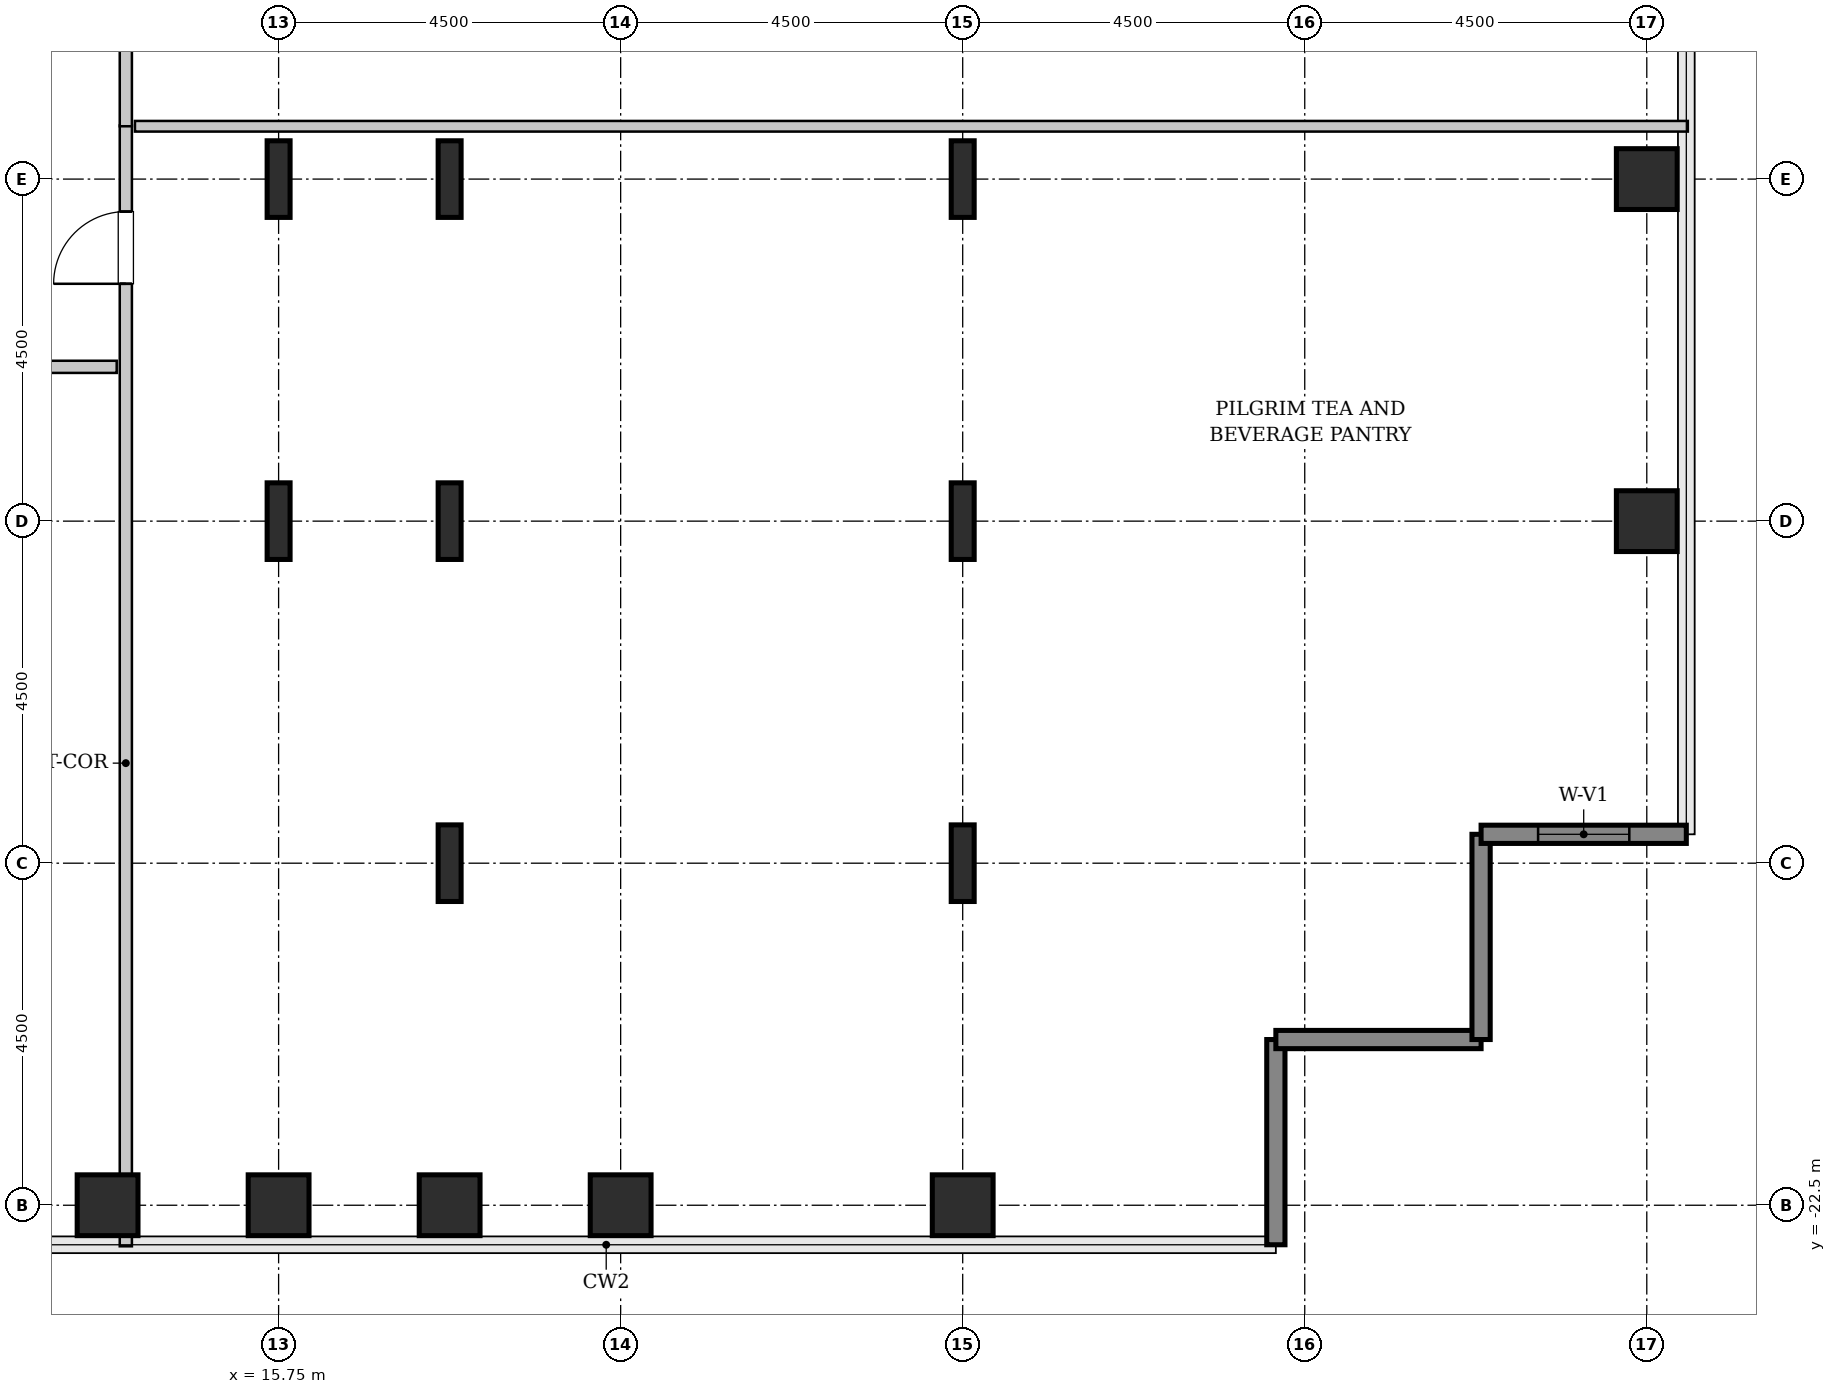
"""IFC4 building model, lengths in metres.
Left out: names, types, materials, properties, quantities, classifications, styles, units other than length and angle.
Written with IfcOpenShell. Run it as: python <this file> out.ifc"""

import sys

from ifc_helpers import new_model, si_unit, direction, frame, frame_2d, origin, origin_2d, place, context, subcontext, project, spatial, rectangle, hollow_rectangle, i_section, extrude, source, transform, mapped, element, fill, save


model = new_model("IFC4")
c1 = context("Model", 3, precision=1e-05, world=origin(), true_north=direction((0.0, 1.0)))
c2 = subcontext(c1, "Body", "Model", "MODEL_VIEW")
j1 = project(units=[si_unit("LENGTHUNIT", "METRE"), si_unit("PLANEANGLEUNIT", "RADIAN")], contexts=[c1])
p1 = place(None, origin())
s1 = spatial("IfcSite", under=j1, at=p1, CompositionType="ELEMENT")
p2 = place(p1, origin())
s2 = spatial("IfcBuilding", under=s1, at=p2, CompositionType="ELEMENT")
p3 = place(p2, frame((0.0, 0.0, 132.6)))
s3 = spatial("IfcBuildingStorey", under=s2, at=p3, CompositionType="ELEMENT", Elevation=132.6)
m1 = source(origin(), c2, "Body", "SweptSolid", [
    extrude(hollow_rectangle(XDim=0.8, YDim=0.8, WallThickness=0.04, InnerFilletRadius=0.04, OuterFilletRadius=0.08, at=origin_2d()), origin(), (0.0, 0.0, 1.0), 3.8),
])
for number, where, z_axis, x_axis in (
    (1, (13.5, -22.5, 0.0), (0.0, 0.0, 1.0), (1.0, 0.0, 0.0)),
    (2, (15.75, -22.5, 0.0), (0.0, 0.0, 1.0), (1.0, 0.0, 0.0)),
):
    element("IfcColumn", number, at=place(p3, frame(where, z_axis=z_axis, x_axis=x_axis)), inside=s3, PredefinedType="COLUMN", context=c2, shape_type="MappedRepresentation", body=[
        mapped(m1, transform((0.0, 0.0, 0.0), x_axis=(1.0, 0.0, 0.0), y_axis=(0.0, 1.0, 0.0), z_axis=(0.0, 0.0, 1.0), scale=1.0)),
    ])
m2 = source(origin(), c2, "Body", "SweptSolid", [
    extrude(i_section(OverallWidth=0.302, OverallDepth=1.008, WebThickness=0.021, FlangeThickness=0.04, FilletRadius=0.03, at=origin_2d()), origin(), (0.0, 0.0, 1.0), 3.8),
])
for number, where, z_axis, x_axis in (
    (3, (15.75, -13.5, 0.0), (0.0, 0.0, 1.0), (1.0, 0.0, 0.0)),
    (4, (15.75, -9.0, 0.0), (0.0, 0.0, 1.0), (1.0, 0.0, 0.0)),
):
    element("IfcColumn", number, at=place(p3, frame(where, z_axis=z_axis, x_axis=x_axis)), inside=s3, PredefinedType="COLUMN", context=c2, shape_type="MappedRepresentation", body=[
        mapped(m2, transform((0.0, 0.0, 0.0), x_axis=(1.0, 0.0, 0.0), y_axis=(0.0, 1.0, 0.0), z_axis=(0.0, 0.0, 1.0), scale=1.0)),
    ])
p4 = place(p3, frame((18.0, -22.5, 0.0), z_axis=(0.0, 0.0, 1.0), x_axis=(1.0, 0.0, 0.0)))
e5 = element("IfcColumn", 5, at=p4, inside=s3, PredefinedType="COLUMN", context=c2, shape_type="MappedRepresentation", body=[
    mapped(m1, transform((0.0, 0.0, 0.0), x_axis=(1.0, 0.0, 0.0), y_axis=(0.0, 1.0, 0.0), z_axis=(0.0, 0.0, 1.0), scale=1.0)),
])
for number, where, z_axis, x_axis in (
    (6, (18.0, -18.0, 0.0), (0.0, 0.0, 1.0), (1.0, 0.0, 0.0)),
    (7, (18.0, -13.5, 0.0), (0.0, 0.0, 1.0), (1.0, 0.0, 0.0)),
    (8, (18.0, -9.0, 0.0), (0.0, 0.0, 1.0), (1.0, 0.0, 0.0)),
):
    element("IfcColumn", number, at=place(p3, frame(where, z_axis=z_axis, x_axis=x_axis)), inside=s3, PredefinedType="COLUMN", context=c2, shape_type="MappedRepresentation", body=[
        mapped(m2, transform((0.0, 0.0, 0.0), x_axis=(1.0, 0.0, 0.0), y_axis=(0.0, 1.0, 0.0), z_axis=(0.0, 0.0, 1.0), scale=1.0)),
    ])
for number, where, z_axis, x_axis in (
    (9, (20.25, -22.5, 0.0), (0.0, 0.0, 1.0), (1.0, 0.0, 0.0)),
    (10, (24.75, -22.5, 0.0), (0.0, 0.0, 1.0), (1.0, 0.0, 0.0)),
):
    element("IfcColumn", number, at=place(p3, frame(where, z_axis=z_axis, x_axis=x_axis)), inside=s3, PredefinedType="COLUMN", context=c2, shape_type="MappedRepresentation", body=[
        mapped(m1, transform((0.0, 0.0, 0.0), x_axis=(1.0, 0.0, 0.0), y_axis=(0.0, 1.0, 0.0), z_axis=(0.0, 0.0, 1.0), scale=1.0)),
    ])
for number, where, z_axis, x_axis in (
    (11, (24.75, -18.0, 0.0), (0.0, 0.0, 1.0), (1.0, 0.0, 0.0)),
    (12, (24.75, -13.5, 0.0), (0.0, 0.0, 1.0), (1.0, 0.0, 0.0)),
    (13, (24.75, -9.0, 0.0), (0.0, 0.0, 1.0), (1.0, 0.0, 0.0)),
):
    element("IfcColumn", number, at=place(p3, frame(where, z_axis=z_axis, x_axis=x_axis)), inside=s3, PredefinedType="COLUMN", context=c2, shape_type="MappedRepresentation", body=[
        mapped(m2, transform((0.0, 0.0, 0.0), x_axis=(1.0, 0.0, 0.0), y_axis=(0.0, 1.0, 0.0), z_axis=(0.0, 0.0, 1.0), scale=1.0)),
    ])
for number, where, z_axis, x_axis in (
    (14, (33.75, -13.5, 0.0), (0.0, 0.0, 1.0), (1.0, 0.0, 0.0)),
    (15, (33.75, -9.0, 0.0), (0.0, 0.0, 1.0), (1.0, 0.0, 0.0)),
):
    element("IfcColumn", number, at=place(p3, frame(where, z_axis=z_axis, x_axis=x_axis)), inside=s3, PredefinedType="COLUMN", context=c2, shape_type="MappedRepresentation", body=[
        mapped(m1, transform((0.0, 0.0, 0.0), x_axis=(1.0, 0.0, 0.0), y_axis=(0.0, 1.0, 0.0), z_axis=(0.0, 0.0, 1.0), scale=1.0)),
    ])
m3 = source(origin(), c2, "Body", "SweptSolid", [
    extrude(rectangle(XDim=2.7, YDim=0.24, at=frame_2d((1.35, 0.0))), origin(), (0.0, 0.0, 1.0), 3.55),
])
for number, where, z_axis, x_axis in (
    (16, (28.87, -23.02, 0.0), (0.0, 0.0, 1.0), (0.0, 1.0, 0.0)),
    (17, (28.87, -20.32, 0.0), (0.0, 0.0, 1.0), (1.0, 0.0, 0.0)),
    (18, (31.57, -20.32, 0.0), (0.0, 0.0, 1.0), (0.0, 1.0, 0.0)),
):
    element("IfcWall", number, at=place(p3, frame(where, z_axis=z_axis, x_axis=x_axis)), inside=s3, PredefinedType="SHEAR", context=c2, shape_type="MappedRepresentation", body=[
        mapped(m3, transform((0.0, 0.0, 0.0), x_axis=(1.0, 0.0, 0.0), y_axis=(0.0, 1.0, 0.0), z_axis=(0.0, 0.0, 1.0), scale=1.0)),
    ])
p5 = place(p3, frame((31.57, -17.62, 0.0), z_axis=(0.0, 0.0, 1.0), x_axis=(1.0, 0.0, 0.0)))
e19 = element("IfcWall", 19, at=p5, inside=s3, PredefinedType="SHEAR", context=c2, shape_type="MappedRepresentation", body=[
    mapped(m3, transform((0.0, 0.0, 0.0), x_axis=(1.0, 0.0, 0.0), y_axis=(0.0, 1.0, 0.0), z_axis=(0.0, 0.0, 1.0), scale=1.0)),
])
p6 = place(p5, frame((0.75, 0.0, 0.85)))
e20 = element("IfcOpeningElement", 20, at=p6, cuts=e19, PredefinedType="OPENING", context=c2, shape_type="SweptSolid", body=[
    extrude(rectangle(XDim=1.2, YDim=1.8, at=frame_2d((0.6, 0.9))), frame((0.0, 0.13, 0.0), z_axis=(0.0, -1.0, 0.0), x_axis=(1.0, 0.0, 0.0)), (0.0, 0.0, 1.0), 0.26),
])
m4 = source(origin(), c2, "Body", "SweptSolid", [
    extrude(rectangle(XDim=14.745, YDim=0.16, at=frame_2d((7.373, 0.0))), origin(), (0.0, 0.0, 1.0), 3.535),
])
p7 = place(p3, frame((13.74, -23.04, 0.0), z_axis=(0.0, 0.0, 1.0), x_axis=(0.0, 1.0, 0.0)))
e21 = element("IfcWall", 21, at=p7, inside=s3, PredefinedType="PARTITIONING", context=c2, shape_type="MappedRepresentation", body=[
    mapped(m4, transform((0.0, 0.0, 0.0), x_axis=(1.0, 0.0, 0.0), y_axis=(0.0, 1.0, 0.0), z_axis=(0.0, 0.0, 1.0), scale=1.0)),
])
p8 = place(p7, frame((12.663, 0.0, 0.0)))
e22 = element("IfcOpeningElement", 22, at=p8, cuts=e21, PredefinedType="OPENING", context=c2, shape_type="SweptSolid", body=[
    extrude(rectangle(XDim=0.95, YDim=2.1, at=frame_2d((0.475, 1.05))), frame((0.0, 0.09, 0.0), z_axis=(0.0, -1.0, 0.0), x_axis=(1.0, 0.0, 0.0)), (0.0, 0.0, 1.0), 0.18),
])
m5 = source(origin(), c2, "Body", "SweptSolid", [
    extrude(rectangle(XDim=20.43, YDim=0.14, at=frame_2d((10.215, 0.0))), origin(), (0.0, 0.0, 1.0), 3.535),
])
p9 = place(p3, frame((13.86, -8.305, 0.0), z_axis=(0.0, 0.0, 1.0), x_axis=(1.0, 0.0, 0.0)))
e23 = element("IfcWall", 23, at=p9, inside=s3, PredefinedType="PARTITIONING", context=c2, shape_type="MappedRepresentation", body=[
    mapped(m5, transform((0.0, 0.0, 0.0), x_axis=(1.0, 0.0, 0.0), y_axis=(0.0, 1.0, 0.0), z_axis=(0.0, 0.0, 1.0), scale=1.0)),
])
m6 = source(origin(), c2, "Body", "SweptSolid", [
    extrude(rectangle(XDim=3.51, YDim=0.16, at=frame_2d((1.755, 0.0))), origin(), (0.0, 0.0, 1.0), 3.535),
])
p10 = place(p3, frame((13.74, -8.305, 0.0), z_axis=(0.0, 0.0, 1.0), x_axis=(0.0, 1.0, 0.0)))
e24 = element("IfcWall", 24, at=p10, inside=s3, PredefinedType="PARTITIONING", context=c2, shape_type="MappedRepresentation", body=[
    mapped(m6, transform((0.0, 0.0, 0.0), x_axis=(1.0, 0.0, 0.0), y_axis=(0.0, 1.0, 0.0), z_axis=(0.0, 0.0, 1.0), scale=1.0)),
])
p11 = place(p10, frame((1.28, 0.0, 0.0)))
e25 = element("IfcOpeningElement", 25, at=p11, cuts=e24, PredefinedType="OPENING", context=c2, shape_type="SweptSolid", body=[
    extrude(rectangle(XDim=0.95, YDim=2.1, at=frame_2d((0.475, 1.05))), frame((0.0, 0.09, 0.0), z_axis=(0.0, -1.0, 0.0), x_axis=(1.0, 0.0, 0.0)), (0.0, 0.0, 1.0), 0.18),
])
m7 = source(origin(), c2, "Body", "SweptSolid", [
    extrude(rectangle(XDim=4.36, YDim=0.16, at=frame_2d((2.18, 0.0))), origin(), (0.0, 0.0, 1.0), 3.535),
])
p12 = place(p3, frame((9.26, -11.47, 0.0), z_axis=(0.0, 0.0, 1.0), x_axis=(1.0, 0.0, 0.0)))
e26 = element("IfcWall", 26, at=p12, inside=s3, PredefinedType="PARTITIONING", context=c2, shape_type="MappedRepresentation", body=[
    mapped(m7, transform((0.0, 0.0, 0.0), x_axis=(1.0, 0.0, 0.0), y_axis=(0.0, 1.0, 0.0), z_axis=(0.0, 0.0, 1.0), scale=1.0)),
])
p13 = place(p12, frame((1.705, 0.0, 0.0)))
e27 = element("IfcOpeningElement", 27, at=p13, cuts=e26, PredefinedType="OPENING", context=c2, shape_type="SweptSolid", body=[
    extrude(rectangle(XDim=0.95, YDim=2.1, at=frame_2d((0.475, 1.05))), frame((0.0, 0.09, 0.0), z_axis=(0.0, -1.0, 0.0), x_axis=(1.0, 0.0, 0.0)), (0.0, 0.0, 1.0), 0.18),
])
m8 = source(origin(), c2, "Body", "SweptSolid", [
    extrude(rectangle(XDim=1.2, YDim=1.8, at=frame_2d((0.6, 0.9))), frame((0.0, 0.03, 0.0), z_axis=(0.0, -1.0, 0.0), x_axis=(1.0, 0.0, 0.0)), (0.0, 0.0, 1.0), 0.06),
])
p14 = place(p6, origin())
e28 = element("IfcWindow", 28, at=p14, inside=s3, PartitioningType="SINGLE_PANEL", PredefinedType="WINDOW", context=c2, shape_type="MappedRepresentation", body=[
    mapped(m8, transform((0.0, 0.0, 0.0), x_axis=(1.0, 0.0, 0.0), y_axis=(0.0, 1.0, 0.0), z_axis=(0.0, 0.0, 1.0), scale=1.0)),
])
fill(e20, e28)
m9 = source(origin(), c2, "Body", "SweptSolid", [
    extrude(rectangle(XDim=0.95, YDim=2.1, at=frame_2d((0.475, 1.05))), frame((0.0, 0.025, 0.0), z_axis=(0.0, -1.0, 0.0), x_axis=(1.0, 0.0, 0.0)), (0.0, 0.0, 1.0), 0.05),
])
p15 = place(p8, origin())
e29 = element("IfcDoor", 29, at=p15, inside=s3, OperationType="SINGLE_SWING_LEFT", PredefinedType="DOOR", context=c2, shape_type="MappedRepresentation", body=[
    mapped(m9, transform((0.0, 0.0, 0.0), x_axis=(1.0, 0.0, 0.0), y_axis=(0.0, 1.0, 0.0), z_axis=(0.0, 0.0, 1.0), scale=1.0)),
])
fill(e22, e29)
save(model, sys.argv[1])
